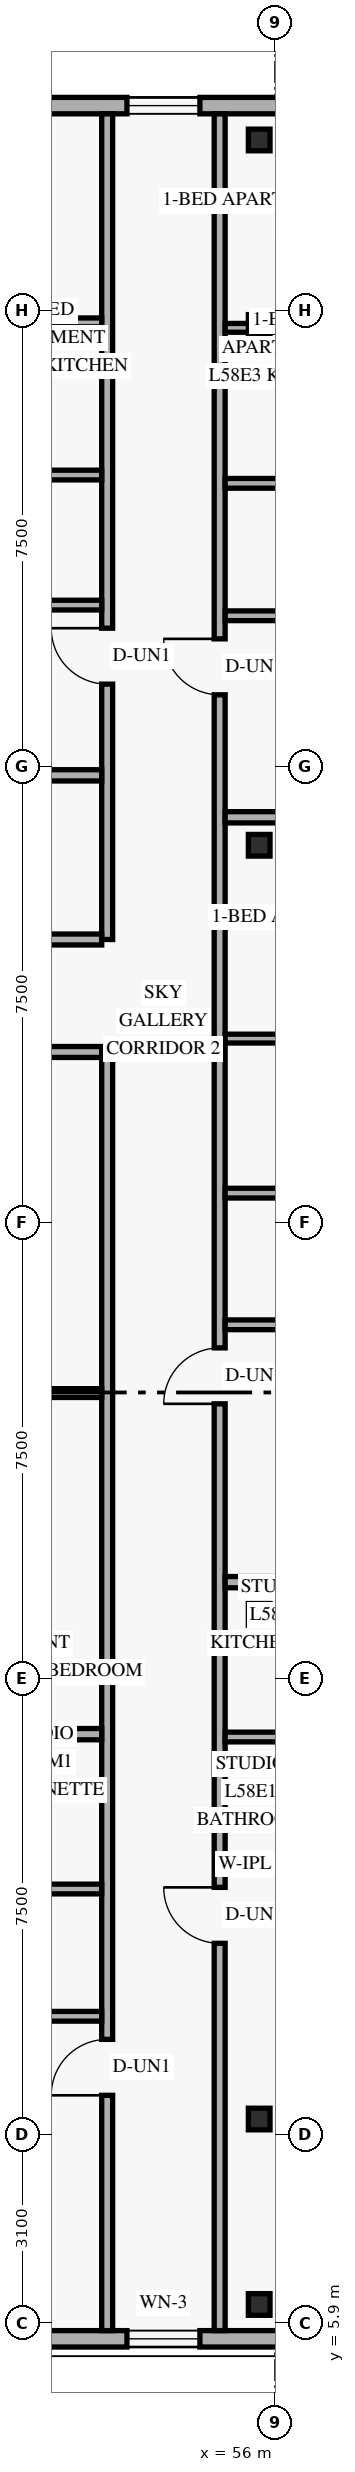
"""IFC4 building model, lengths in metres.
Left out: names, types, materials, properties, quantities, classifications, styles, units other than length and angle.
Written with IfcOpenShell. Run it as: python <this file> out.ifc"""

import sys

from ifc_helpers import new_model, si_unit, direction, frame, frame_2d, origin, origin_2d, place, context, subcontext, project, spatial, rectangle, hollow_rectangle, extrude, element, fill, save


model = new_model("IFC4")
c1 = context("Model", 3, precision=1e-05, world=origin(), true_north=direction((0.0, 1.0)))
c2 = subcontext(c1, "Body", "Model", "MODEL_VIEW")
j1 = project(units=[si_unit("LENGTHUNIT", "METRE"), si_unit("PLANEANGLEUNIT", "RADIAN")], contexts=[c1])
p1 = place(None, origin())
s1 = spatial("IfcSite", under=j1, at=p1, CompositionType="ELEMENT")
p2 = place(p1, origin())
s2 = spatial("IfcBuilding", under=s1, at=p2, CompositionType="ELEMENT")
p3 = place(p2, frame((0.0, 0.0, 223.8)))
s3 = spatial("IfcBuildingStorey", under=s2, at=p3, CompositionType="ELEMENT", Elevation=223.8)
for number, where, z_axis, x_axis in (
    (1, (55.637, 6.2, 0.0), (0.058, 0.0, 0.998), (0.0, 1.0, 0.0)),
    (2, (55.637, 9.25, 0.0), (0.058, 0.0, 0.998), (0.0, 1.0, 0.0)),
    (3, (55.637, 17.55, 0.0), (0.058, 0.0, 0.998), (0.0, 1.0, 0.0)),
    (4, (55.637, 30.2, 0.0), (0.058, 0.0, 0.998), (0.0, 1.0, 0.0)),
    (5, (55.637, 38.75, 0.0), (0.058, 0.0, 0.998), (0.0, 1.0, 0.0)),
    (6, (55.637, 41.8, 0.0), (0.058, 0.0, 0.998), (0.0, 1.0, 0.0)),
):
    element("IfcColumn", number, at=place(p3, frame(where, z_axis=z_axis, x_axis=x_axis)), inside=s3, PredefinedType="COLUMN", context=c2, shape_type="SweptSolid", body=[
        extrude(hollow_rectangle(XDim=0.356, YDim=0.356, WallThickness=0.016, at=origin_2d()), origin(), (0.0, 0.0, 1.0), 3.606),
    ])
p4 = place(p3, frame((25.82, 5.635, 0.0), z_axis=(0.0, 0.0, 1.0), x_axis=(1.0, 0.0, 0.0)))
e7 = element("IfcWall", 7, at=p4, inside=s3, PredefinedType="SOLIDWALL", context=c2, shape_type="SweptSolid", body=[
    extrude(rectangle(XDim=32.96, YDim=0.27, at=frame_2d((16.48, 0.0))), origin(), (0.0, 0.0, 1.0), 3.36),
])
p5 = place(p4, frame((3.87, 0.0, 0.85)))
e8 = element("IfcOpeningElement", 8, at=p5, cuts=e7, PredefinedType="OPENING", context=c2, shape_type="SweptSolid", body=[
    extrude(rectangle(XDim=1.2, YDim=1.5, at=frame_2d((0.6, 0.75))), frame((0.0, 0.145, 0.0), z_axis=(0.0, -1.0, 0.0), x_axis=(1.0, 0.0, 0.0)), (0.0, 0.0, 1.0), 0.29),
])
p6 = place(p4, frame((16.451, 0.0, 0.85)))
e9 = element("IfcOpeningElement", 9, at=p6, cuts=e7, PredefinedType="OPENING", context=c2, shape_type="SweptSolid", body=[
    extrude(rectangle(XDim=1.2, YDim=1.5, at=frame_2d((0.6, 0.75))), frame((0.0, 0.145, 0.0), z_axis=(0.0, -1.0, 0.0), x_axis=(1.0, 0.0, 0.0)), (0.0, 0.0, 1.0), 0.29),
])
p7 = place(p4, frame((27.747, 0.0, 0.85)))
e10 = element("IfcOpeningElement", 10, at=p7, cuts=e7, PredefinedType="OPENING", context=c2, shape_type="SweptSolid", body=[
    extrude(rectangle(XDim=1.2, YDim=1.5, at=frame_2d((0.6, 0.75))), frame((0.0, 0.145, 0.0), z_axis=(0.0, -1.0, 0.0), x_axis=(1.0, 0.0, 0.0)), (0.0, 0.0, 1.0), 0.29),
])
p8 = place(p4, frame((31.061, 0.0, 0.85)))
e11 = element("IfcOpeningElement", 11, at=p8, cuts=e7, PredefinedType="OPENING", context=c2, shape_type="SweptSolid", body=[
    extrude(rectangle(XDim=1.2, YDim=1.5, at=frame_2d((0.6, 0.75))), frame((0.0, 0.145, 0.0), z_axis=(0.0, -1.0, 0.0), x_axis=(1.0, 0.0, 0.0)), (0.0, 0.0, 1.0), 0.29),
])
p9 = place(p3, frame((58.78, 42.365, 0.0), z_axis=(0.0, 0.0, 1.0), x_axis=(-1.0, 0.0, 0.0)))
e12 = element("IfcWall", 12, at=p9, inside=s3, PredefinedType="SOLIDWALL", context=c2, shape_type="SweptSolid", body=[
    extrude(rectangle(XDim=32.96, YDim=0.27, at=frame_2d((16.48, 0.0))), origin(), (0.0, 0.0, 1.0), 3.36),
])
p10 = place(p9, frame((27.89, 0.0, 0.85)))
e13 = element("IfcOpeningElement", 13, at=p10, cuts=e12, PredefinedType="OPENING", context=c2, shape_type="SweptSolid", body=[
    extrude(rectangle(XDim=1.2, YDim=1.5, at=frame_2d((0.6, 0.75))), frame((0.0, 0.145, 0.0), z_axis=(0.0, -1.0, 0.0), x_axis=(1.0, 0.0, 0.0)), (0.0, 0.0, 1.0), 0.29),
])
p11 = place(p9, frame((15.034, 0.0, 0.85)))
e14 = element("IfcOpeningElement", 14, at=p11, cuts=e12, PredefinedType="OPENING", context=c2, shape_type="SweptSolid", body=[
    extrude(rectangle(XDim=1.2, YDim=1.5, at=frame_2d((0.6, 0.75))), frame((0.0, 0.145, 0.0), z_axis=(0.0, -1.0, 0.0), x_axis=(1.0, 0.0, 0.0)), (0.0, 0.0, 1.0), 0.29),
])
p12 = place(p9, frame((4.013, 0.0, 0.85)))
e15 = element("IfcOpeningElement", 15, at=p12, cuts=e12, PredefinedType="OPENING", context=c2, shape_type="SweptSolid", body=[
    extrude(rectangle(XDim=1.2, YDim=1.5, at=frame_2d((0.6, 0.75))), frame((0.0, 0.145, 0.0), z_axis=(0.0, -1.0, 0.0), x_axis=(1.0, 0.0, 0.0)), (0.0, 0.0, 1.0), 0.29),
])
p13 = place(p9, frame((0.699, 0.0, 0.85)))
e16 = element("IfcOpeningElement", 16, at=p13, cuts=e12, PredefinedType="OPENING", context=c2, shape_type="SweptSolid", body=[
    extrude(rectangle(XDim=1.2, YDim=1.5, at=frame_2d((0.6, 0.75))), frame((0.0, 0.145, 0.0), z_axis=(0.0, -1.0, 0.0), x_axis=(1.0, 0.0, 0.0)), (0.0, 0.0, 1.0), 0.29),
])
p14 = place(p3, frame((53.242, 5.77, 0.0), z_axis=(0.0, 0.0, 1.0), x_axis=(0.0, 1.0, 0.0)))
e17 = element("IfcWall", 17, at=p14, inside=s3, PredefinedType="STANDARD", context=c2, shape_type="SweptSolid", body=[
    extrude(rectangle(XDim=21.03, YDim=0.18, at=frame_2d((10.515, 0.0))), origin(), (0.0, 0.0, 1.0), 2.803),
])
p15 = place(p14, frame((3.87, 0.0, 0.0)))
e18 = element("IfcOpeningElement", 18, at=p15, cuts=e17, PredefinedType="OPENING", context=c2, shape_type="SweptSolid", body=[
    extrude(rectangle(XDim=0.92, YDim=2.15, at=frame_2d((0.46, 1.075))), frame((0.0, 0.1, 0.0), z_axis=(0.0, -1.0, 0.0), x_axis=(1.0, 0.0, 0.0)), (0.0, 0.0, 1.0), 0.2),
])
p16 = place(p3, frame((53.242, 28.65, 0.0), z_axis=(0.0, 0.0, 1.0), x_axis=(0.0, 1.0, 0.0)))
e19 = element("IfcWall", 19, at=p16, inside=s3, PredefinedType="STANDARD", context=c2, shape_type="SweptSolid", body=[
    extrude(rectangle(XDim=13.58, YDim=0.18, at=frame_2d((6.79, 0.0))), origin(), (0.0, 0.0, 1.0), 2.803),
])
p17 = place(p16, frame((4.2, 0.0, 0.0)))
e20 = element("IfcOpeningElement", 20, at=p17, cuts=e19, PredefinedType="OPENING", context=c2, shape_type="SweptSolid", body=[
    extrude(rectangle(XDim=0.92, YDim=2.15, at=frame_2d((0.46, 1.075))), frame((0.0, 0.1, 0.0), z_axis=(0.0, -1.0, 0.0), x_axis=(1.0, 0.0, 0.0)), (0.0, 0.0, 1.0), 0.2),
])
p18 = place(p3, frame((37.64, 26.8, 0.0), z_axis=(0.0, 0.0, 1.0), x_axis=(1.0, 0.0, 0.0)))
e21 = element("IfcWall", 21, at=p18, inside=s3, PredefinedType="STANDARD", context=c2, shape_type="SweptSolid", body=[
    extrude(rectangle(XDim=15.512, YDim=0.18, at=frame_2d((7.756, 0.0))), origin(), (0.0, 0.0, 1.0), 2.803),
])
p19 = place(p18, frame((0.32, 0.0, 0.0)))
e22 = element("IfcOpeningElement", 22, at=p19, cuts=e21, PredefinedType="OPENING", context=c2, shape_type="SweptSolid", body=[
    extrude(rectangle(XDim=0.92, YDim=2.15, at=frame_2d((0.46, 1.075))), frame((0.0, 0.1, 0.0), z_axis=(0.0, -1.0, 0.0), x_axis=(1.0, 0.0, 0.0)), (0.0, 0.0, 1.0), 0.2),
])
p20 = place(p3, frame((37.64, 28.65, 0.0), z_axis=(0.0, 0.0, 1.0), x_axis=(1.0, 0.0, 0.0)))
e23 = element("IfcWall", 23, at=p20, inside=s3, PredefinedType="STANDARD", context=c2, shape_type="SweptSolid", body=[
    extrude(rectangle(XDim=15.512, YDim=0.18, at=frame_2d((7.756, 0.0))), origin(), (0.0, 0.0, 1.0), 2.803),
])
p21 = place(p3, frame((55.092, 5.77, 0.0), z_axis=(0.0, 0.0, 1.0), x_axis=(0.0, 1.0, 0.0)))
e24 = element("IfcWall", 24, at=p21, inside=s3, PredefinedType="STANDARD", context=c2, shape_type="SweptSolid", body=[
    extrude(rectangle(XDim=36.46, YDim=0.18, at=frame_2d((18.23, 0.0))), origin(), (0.0, 0.0, 1.0), 2.803),
])
p22 = place(p21, frame((6.37, 0.0, 0.0)))
e25 = element("IfcOpeningElement", 25, at=p22, cuts=e24, PredefinedType="OPENING", context=c2, shape_type="SweptSolid", body=[
    extrude(rectangle(XDim=0.92, YDim=2.15, at=frame_2d((0.46, 1.075))), frame((0.0, 0.1, 0.0), z_axis=(0.0, -1.0, 0.0), x_axis=(1.0, 0.0, 0.0)), (0.0, 0.0, 1.0), 0.2),
])
p23 = place(p21, frame((15.243, 0.0, 0.0)))
e26 = element("IfcOpeningElement", 26, at=p23, cuts=e24, PredefinedType="OPENING", context=c2, shape_type="SweptSolid", body=[
    extrude(rectangle(XDim=0.92, YDim=2.15, at=frame_2d((0.46, 1.075))), frame((0.0, 0.1, 0.0), z_axis=(0.0, -1.0, 0.0), x_axis=(1.0, 0.0, 0.0)), (0.0, 0.0, 1.0), 0.2),
])
p24 = place(p21, frame((26.905, 0.0, 0.0)))
e27 = element("IfcOpeningElement", 27, at=p24, cuts=e24, PredefinedType="OPENING", context=c2, shape_type="SweptSolid", body=[
    extrude(rectangle(XDim=0.92, YDim=2.15, at=frame_2d((0.46, 1.075))), frame((0.0, 0.1, 0.0), z_axis=(0.0, -1.0, 0.0), x_axis=(1.0, 0.0, 0.0)), (0.0, 0.0, 1.0), 0.2),
])
p25 = place(p3, frame((55.182, 13.44, 0.0), z_axis=(0.0, 0.0, 1.0), x_axis=(1.0, 0.0, 0.0)))
e28 = element("IfcWall", 28, at=p25, inside=s3, PredefinedType="PLUMBINGWALL", context=c2, shape_type="SweptSolid", body=[
    extrude(rectangle(XDim=2.606, YDim=0.16, at=frame_2d((1.303, 0.0))), origin(), (0.0, 0.0, 1.0), 2.803),
])
p26 = place(p3, frame((55.182, 15.533, 0.0), z_axis=(0.0, 0.0, 1.0), x_axis=(1.0, 0.0, 0.0)))
e29 = element("IfcWall", 29, at=p26, inside=s3, PredefinedType="PLUMBINGWALL", context=c2, shape_type="SweptSolid", body=[
    extrude(rectangle(XDim=2.446, YDim=0.16, at=frame_2d((1.223, 0.0))), origin(), (0.0, 0.0, 1.0), 2.803),
])
p27 = place(p3, frame((55.182, 18.08, 0.0), z_axis=(0.0, 0.0, 1.0), x_axis=(1.0, 0.0, 0.0)))
e30 = element("IfcWall", 30, at=p27, inside=s3, PredefinedType="PARTITIONING", context=c2, shape_type="SweptSolid", body=[
    extrude(rectangle(XDim=6.948, YDim=0.185, at=frame_2d((3.474, 0.0))), origin(), (0.0, 0.0, 1.0), 2.803),
])
p28 = place(p3, frame((55.182, 27.02, 0.0), z_axis=(0.0, 0.0, 1.0), x_axis=(1.0, 0.0, 0.0)))
e31 = element("IfcWall", 31, at=p28, inside=s3, PredefinedType="PARTITIONING", context=c2, shape_type="SweptSolid", body=[
    extrude(rectangle(XDim=6.948, YDim=0.145, at=frame_2d((3.474, 0.0))), origin(), (0.0, 0.0, 1.0), 2.803),
])
p29 = place(p28, frame((4.49, 0.0, 0.0)))
e32 = element("IfcOpeningElement", 32, at=p29, cuts=e31, PredefinedType="OPENING", context=c2, shape_type="SweptSolid", body=[
    extrude(rectangle(XDim=0.9, YDim=2.14, at=frame_2d((0.45, 1.07))), frame((0.0, 0.083, 0.0), z_axis=(0.0, -1.0, 0.0), x_axis=(1.0, 0.0, 0.0)), (0.0, 0.0, 1.0), 0.165),
])
p30 = place(p3, frame((55.182, 22.313, 0.0), z_axis=(0.0, 0.0, 1.0), x_axis=(1.0, 0.0, 0.0)))
e33 = element("IfcWall", 33, at=p30, inside=s3, PredefinedType="PLUMBINGWALL", context=c2, shape_type="SweptSolid", body=[
    extrude(rectangle(XDim=2.712, YDim=0.16, at=frame_2d((1.356, 0.0))), origin(), (0.0, 0.0, 1.0), 2.803),
])
p31 = place(p3, frame((55.182, 24.478, 0.0), z_axis=(0.0, 0.0, 1.0), x_axis=(1.0, 0.0, 0.0)))
e34 = element("IfcWall", 34, at=p31, inside=s3, PredefinedType="PLUMBINGWALL", context=c2, shape_type="SweptSolid", body=[
    extrude(rectangle(XDim=2.552, YDim=0.16, at=frame_2d((1.276, 0.0))), origin(), (0.0, 0.0, 1.0), 2.803),
])
p32 = place(p3, frame((55.182, 30.66, 0.0), z_axis=(0.0, 0.0, 1.0), x_axis=(1.0, 0.0, 0.0)))
e35 = element("IfcWall", 35, at=p32, inside=s3, PredefinedType="PARTITIONING", context=c2, shape_type="SweptSolid", body=[
    extrude(rectangle(XDim=6.948, YDim=0.185, at=frame_2d((3.474, 0.0))), origin(), (0.0, 0.0, 1.0), 2.803),
])
p33 = place(p3, frame((55.182, 38.71, 0.0), z_axis=(0.0, 0.0, 1.0), x_axis=(1.0, 0.0, 0.0)))
e36 = element("IfcWall", 36, at=p33, inside=s3, PredefinedType="PARTITIONING", context=c2, shape_type="SweptSolid", body=[
    extrude(rectangle(XDim=6.948, YDim=0.145, at=frame_2d((3.474, 0.0))), origin(), (0.0, 0.0, 1.0), 2.803),
])
p34 = place(p33, frame((4.528, 0.0, 0.0)))
e37 = element("IfcOpeningElement", 37, at=p34, cuts=e36, PredefinedType="OPENING", context=c2, shape_type="SweptSolid", body=[
    extrude(rectangle(XDim=0.9, YDim=2.14, at=frame_2d((0.45, 1.07))), frame((0.0, 0.083, 0.0), z_axis=(0.0, -1.0, 0.0), x_axis=(1.0, 0.0, 0.0)), (0.0, 0.0, 1.0), 0.165),
])
p35 = place(p3, frame((55.182, 33.975, 0.0), z_axis=(0.0, 0.0, 1.0), x_axis=(1.0, 0.0, 0.0)))
e38 = element("IfcWall", 38, at=p35, inside=s3, PredefinedType="PLUMBINGWALL", context=c2, shape_type="SweptSolid", body=[
    extrude(rectangle(XDim=2.788, YDim=0.16, at=frame_2d((1.394, 0.0))), origin(), (0.0, 0.0, 1.0), 2.803),
])
p36 = place(p3, frame((55.182, 36.153, 0.0), z_axis=(0.0, 0.0, 1.0), x_axis=(1.0, 0.0, 0.0)))
e39 = element("IfcWall", 39, at=p36, inside=s3, PredefinedType="PLUMBINGWALL", context=c2, shape_type="SweptSolid", body=[
    extrude(rectangle(XDim=2.628, YDim=0.16, at=frame_2d((1.314, 0.0))), origin(), (0.0, 0.0, 1.0), 2.803),
])
p37 = place(p3, frame((38.423, 15.58, 0.0), z_axis=(0.0, 0.0, 1.0), x_axis=(1.0, 0.0, 0.0)))
e40 = element("IfcWall", 40, at=p37, inside=s3, PredefinedType="PARTITIONING", context=c2, shape_type="SweptSolid", body=[
    extrude(rectangle(XDim=14.729, YDim=0.185, at=frame_2d((7.365, 0.0))), origin(), (0.0, 0.0, 1.0), 2.803),
])
p38 = place(p3, frame((50.318, 10.94, 0.0), z_axis=(0.0, 0.0, 1.0), x_axis=(1.0, 0.0, 0.0)))
e41 = element("IfcWall", 41, at=p38, inside=s3, PredefinedType="PLUMBINGWALL", context=c2, shape_type="SweptSolid", body=[
    extrude(rectangle(XDim=2.834, YDim=0.16, at=frame_2d((1.417, 0.0))), origin(), (0.0, 0.0, 1.0), 3.36),
])
p39 = place(p3, frame((50.478, 13.033, 0.0), z_axis=(0.0, 0.0, 1.0), x_axis=(1.0, 0.0, 0.0)))
e42 = element("IfcWall", 42, at=p39, inside=s3, PredefinedType="PLUMBINGWALL", context=c2, shape_type="SweptSolid", body=[
    extrude(rectangle(XDim=2.674, YDim=0.16, at=frame_2d((1.337, 0.0))), origin(), (0.0, 0.0, 1.0), 3.36),
])
p40 = place(p3, frame((49.932, 21.19, 0.0), z_axis=(0.0, 0.0, 1.0), x_axis=(1.0, 0.0, 0.0)))
e43 = element("IfcWall", 43, at=p40, inside=s3, PredefinedType="PARTITIONING", context=c2, shape_type="SweptSolid", body=[
    extrude(rectangle(XDim=3.22, YDim=0.145, at=frame_2d((1.61, 0.0))), origin(), (0.0, 0.0, 1.0), 2.803),
])
p41 = place(p3, frame((38.972, 31.35, 0.0), z_axis=(0.0, 0.0, 1.0), x_axis=(1.0, 0.0, 0.0)))
e44 = element("IfcWall", 44, at=p41, inside=s3, PredefinedType="PARTITIONING", context=c2, shape_type="SweptSolid", body=[
    extrude(rectangle(XDim=14.179, YDim=0.185, at=frame_2d((7.09, 0.0))), origin(), (0.0, 0.0, 1.0), 2.803),
])
p42 = place(p3, frame((38.51, 38.8, 0.0), z_axis=(0.0, 0.0, 1.0), x_axis=(1.0, 0.0, 0.0)))
e45 = element("IfcWall", 45, at=p42, inside=s3, PredefinedType="PARTITIONING", context=c2, shape_type="SweptSolid", body=[
    extrude(rectangle(XDim=14.642, YDim=0.145, at=frame_2d((7.321, 0.0))), origin(), (0.0, 0.0, 1.0), 2.803),
])
p43 = place(p42, frame((7.482, 0.0, 0.0)))
e46 = element("IfcOpeningElement", 46, at=p43, cuts=e45, PredefinedType="OPENING", context=c2, shape_type="SweptSolid", body=[
    extrude(rectangle(XDim=0.9, YDim=2.14, at=frame_2d((0.45, 1.07))), frame((0.0, 0.083, 0.0), z_axis=(0.0, -1.0, 0.0), x_axis=(1.0, 0.0, 0.0)), (0.0, 0.0, 1.0), 0.165),
])
p44 = place(p3, frame((50.592, 34.15, 0.0), z_axis=(0.0, 0.0, 1.0), x_axis=(1.0, 0.0, 0.0)))
e47 = element("IfcWall", 47, at=p44, inside=s3, PredefinedType="PLUMBINGWALL", context=c2, shape_type="SweptSolid", body=[
    extrude(rectangle(XDim=2.56, YDim=0.16, at=frame_2d((1.28, 0.0))), origin(), (0.0, 0.0, 1.0), 3.36),
])
p45 = place(p3, frame((50.752, 36.289, 0.0), z_axis=(0.0, 0.0, 1.0), x_axis=(1.0, 0.0, 0.0)))
e48 = element("IfcWall", 48, at=p45, inside=s3, PredefinedType="PLUMBINGWALL", context=c2, shape_type="SweptSolid", body=[
    extrude(rectangle(XDim=2.4, YDim=0.16, at=frame_2d((1.2, 0.0))), origin(), (0.0, 0.0, 1.0), 3.36),
])
p46 = place(p7, origin())
e49 = element("IfcWindow", 49, at=p46, inside=s3, PartitioningType="SINGLE_PANEL", PredefinedType="WINDOW", context=c2, shape_type="SweptSolid", body=[
    extrude(rectangle(XDim=1.2, YDim=1.5, at=frame_2d((0.6, 0.75))), frame((0.0, 0.03, 0.0), z_axis=(0.0, -1.0, 0.0), x_axis=(1.0, 0.0, 0.0)), (0.0, 0.0, 1.0), 0.06),
])
fill(e10, e49)
p47 = place(p12, origin())
e50 = element("IfcWindow", 50, at=p47, inside=s3, PartitioningType="SINGLE_PANEL", PredefinedType="WINDOW", context=c2, shape_type="SweptSolid", body=[
    extrude(rectangle(XDim=1.2, YDim=1.5, at=frame_2d((0.6, 0.75))), frame((0.0, 0.03, 0.0), z_axis=(0.0, -1.0, 0.0), x_axis=(1.0, 0.0, 0.0)), (0.0, 0.0, 1.0), 0.06),
])
fill(e15, e50)
p48 = place(p22, origin())
e51 = element("IfcDoor", 51, at=p48, inside=s3, OperationType="SINGLE_SWING_RIGHT", PredefinedType="DOOR", context=c2, shape_type="SweptSolid", body=[
    extrude(rectangle(XDim=0.92, YDim=2.15, at=frame_2d((0.46, 1.075))), frame((0.0, 0.025, 0.0), z_axis=(0.0, -1.0, 0.0), x_axis=(1.0, 0.0, 0.0)), (0.0, 0.0, 1.0), 0.05),
])
fill(e25, e51)
p49 = place(p23, origin())
e52 = element("IfcDoor", 52, at=p49, inside=s3, OperationType="SINGLE_SWING_LEFT", PredefinedType="DOOR", context=c2, shape_type="SweptSolid", body=[
    extrude(rectangle(XDim=0.92, YDim=2.15, at=frame_2d((0.46, 1.075))), frame((0.0, 0.025, 0.0), z_axis=(0.0, -1.0, 0.0), x_axis=(1.0, 0.0, 0.0)), (0.0, 0.0, 1.0), 0.05),
])
fill(e26, e52)
p50 = place(p24, origin())
e53 = element("IfcDoor", 53, at=p50, inside=s3, OperationType="SINGLE_SWING_RIGHT", PredefinedType="DOOR", context=c2, shape_type="SweptSolid", body=[
    extrude(rectangle(XDim=0.92, YDim=2.15, at=frame_2d((0.46, 1.075))), frame((0.0, 0.025, 0.0), z_axis=(0.0, -1.0, 0.0), x_axis=(1.0, 0.0, 0.0)), (0.0, 0.0, 1.0), 0.05),
])
fill(e27, e53)
p51 = place(p15, origin())
e54 = element("IfcDoor", 54, at=p51, inside=s3, OperationType="SINGLE_SWING_LEFT", PredefinedType="DOOR", context=c2, shape_type="SweptSolid", body=[
    extrude(rectangle(XDim=0.92, YDim=2.15, at=frame_2d((0.46, 1.075))), frame((0.0, 0.025, 0.0), z_axis=(0.0, -1.0, 0.0), x_axis=(1.0, 0.0, 0.0)), (0.0, 0.0, 1.0), 0.05),
])
fill(e18, e54)
p52 = place(p17, origin())
e55 = element("IfcDoor", 55, at=p52, inside=s3, OperationType="SINGLE_SWING_RIGHT", PredefinedType="DOOR", context=c2, shape_type="SweptSolid", body=[
    extrude(rectangle(XDim=0.92, YDim=2.15, at=frame_2d((0.46, 1.075))), frame((0.0, 0.025, 0.0), z_axis=(0.0, -1.0, 0.0), x_axis=(1.0, 0.0, 0.0)), (0.0, 0.0, 1.0), 0.05),
])
fill(e20, e55)
save(model, sys.argv[1])
